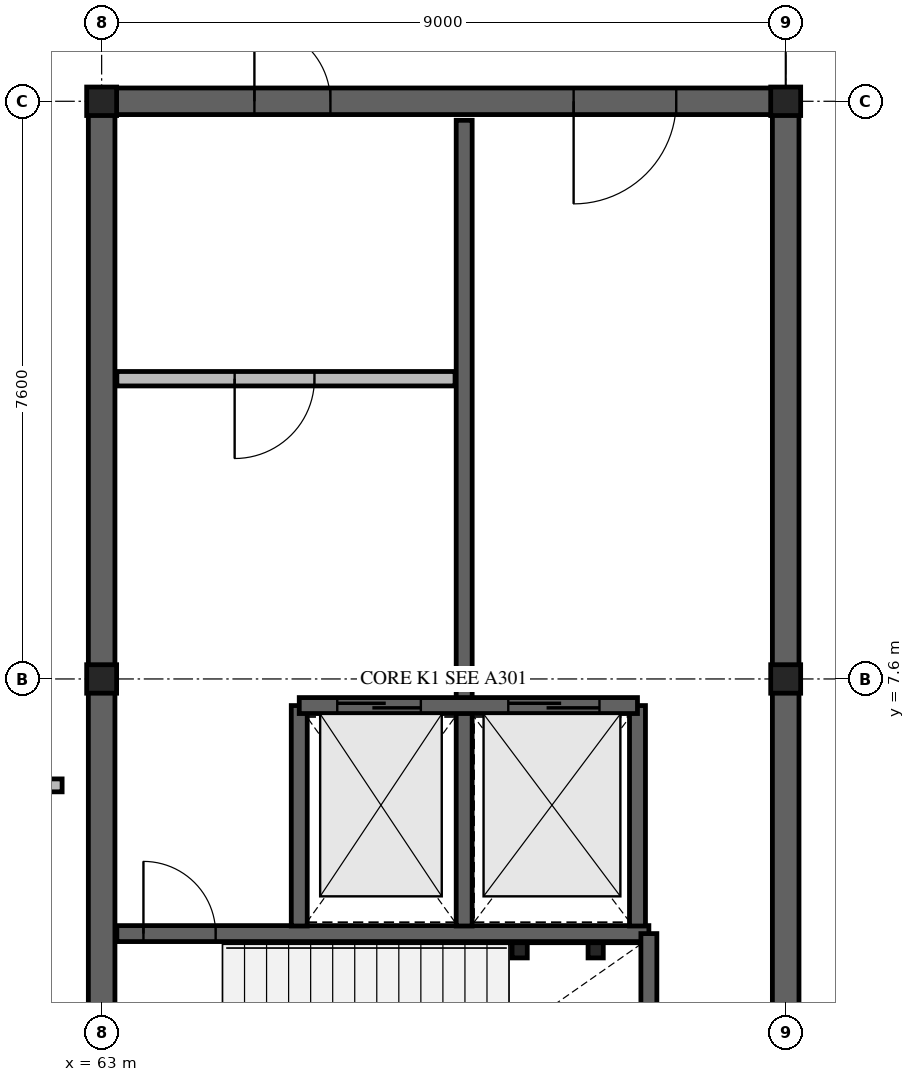
"""IFC4 building model, lengths in metres.
Left out: names, types, materials, properties, quantities, classifications, styles, units other than length and angle.
Written with IfcOpenShell. Run it as: python <this file> out.ifc"""

import sys

from ifc_helpers import new_model, si_unit, direction, frame, frame_2d, origin, origin_2d, place, context, subcontext, project, spatial, rectangle, hollow_rectangle, i_section, extrude, element, fill, save


model = new_model("IFC4")
c1 = context("Model", 3, precision=1e-05, world=origin(), true_north=direction((0.0, 1.0)))
c2 = subcontext(c1, "Body", "Model", "MODEL_VIEW")
j1 = project(units=[si_unit("LENGTHUNIT", "METRE"), si_unit("PLANEANGLEUNIT", "RADIAN")], contexts=[c1])
p1 = place(None, origin())
s1 = spatial("IfcSite", under=j1, at=p1, CompositionType="ELEMENT")
p2 = place(p1, origin())
s2 = spatial("IfcBuilding", under=s1, at=p2, CompositionType="ELEMENT")
p3 = place(p2, origin())
s3 = spatial("IfcBuildingStorey", under=s2, at=p3, CompositionType="ELEMENT", Elevation=0.0)
for number, where, z_axis, x_axis in (
    (1, (63.0, 7.6, 0.0), (0.0, 0.0, 1.0), (1.0, 0.0, 0.0)),
    (2, (63.0, 15.2, 0.0), (0.0, 0.0, 1.0), (1.0, 0.0, 0.0)),
    (3, (72.0, 7.6, 0.0), (0.0, 0.0, 1.0), (1.0, 0.0, 0.0)),
    (4, (72.0, 15.2, 0.0), (0.0, 0.0, 1.0), (1.0, 0.0, 0.0)),
):
    element("IfcColumn", number, at=place(p3, frame(where, z_axis=z_axis, x_axis=x_axis)), inside=s3, PredefinedType="COLUMN", context=c2, shape_type="SweptSolid", body=[
        extrude(i_section(OverallWidth=0.394, OverallDepth=0.375, WebThickness=0.017, FlangeThickness=0.028, FilletRadius=0.018, at=origin_2d()), origin(), (0.0, 0.0, 1.0), 5.04),
    ])
p4 = place(p3, frame((63.16, 15.2, 0.0), z_axis=(0.0, 0.0, 1.0), x_axis=(1.0, 0.0, 0.0)))
e5 = element("IfcWall", 5, at=p4, inside=s3, PredefinedType="SHEAR", context=c2, shape_type="SweptSolid", body=[
    extrude(rectangle(XDim=8.68, YDim=0.35, at=frame_2d((4.34, 0.0))), origin(), (0.0, 0.0, 1.0), 4.76),
])
p5 = place(p4, frame((1.85, 0.0, 0.0)))
e6 = element("IfcOpeningElement", 6, at=p5, cuts=e5, PredefinedType="OPENING", context=c2, shape_type="SweptSolid", body=[
    extrude(rectangle(XDim=1.0, YDim=2.15, at=frame_2d((0.5, 1.075))), frame((0.0, 0.185, 0.0), z_axis=(0.0, -1.0, 0.0), x_axis=(1.0, 0.0, 0.0)), (0.0, 0.0, 1.0), 0.37),
])
p6 = place(p4, frame((6.05, 0.0, 0.0)))
e7 = element("IfcOpeningElement", 7, at=p6, cuts=e5, PredefinedType="OPENING", context=c2, shape_type="SweptSolid", body=[
    extrude(rectangle(XDim=1.35, YDim=2.18, at=frame_2d((0.675, 1.09))), frame((0.0, 0.185, 0.0), z_axis=(0.0, -1.0, 0.0), x_axis=(1.0, 0.0, 0.0)), (0.0, 0.0, 1.0), 0.37),
])
for number, where, z_axis, x_axis in (
    (8, (63.0, 0.16, 0.0), (0.0, 0.0, 1.0), (0.0, 1.0, 0.0)),
    (9, (72.0, 0.16, 0.0), (0.0, 0.0, 1.0), (0.0, 1.0, 0.0)),
):
    element("IfcWall", number, at=place(p3, frame(where, z_axis=z_axis, x_axis=x_axis)), inside=s3, PredefinedType="SHEAR", context=c2, shape_type="SweptSolid", body=[
        extrude(rectangle(XDim=14.88, YDim=0.35, at=frame_2d((7.44, 0.0))), origin(), (0.0, 0.0, 1.0), 4.76),
    ])
p7 = place(p3, frame((63.2, 4.25, 0.0), z_axis=(0.0, 0.0, 1.0), x_axis=(1.0, 0.0, 0.0)))
e10 = element("IfcWall", 10, at=p7, inside=s3, PredefinedType="SOLIDWALL", context=c2, shape_type="SweptSolid", body=[
    extrude(rectangle(XDim=7.0, YDim=0.21, at=frame_2d((3.5, 0.0))), origin(), (0.0, 0.0, 1.0), 4.76),
])
p8 = place(p7, frame((0.35, 0.0, 0.0)))
e11 = element("IfcOpeningElement", 11, at=p8, cuts=e10, PredefinedType="OPENING", context=c2, shape_type="SweptSolid", body=[
    extrude(rectangle(XDim=0.95, YDim=2.12, at=frame_2d((0.475, 1.06))), frame((0.0, 0.115, 0.0), z_axis=(0.0, -1.0, 0.0), x_axis=(1.0, 0.0, 0.0)), (0.0, 0.0, 1.0), 0.23),
])
p9 = place(p3, frame((70.2, 0.2, 0.0), z_axis=(0.0, 0.0, 1.0), x_axis=(0.0, 1.0, 0.0)))
e12 = element("IfcWall", 12, at=p9, inside=s3, PredefinedType="SOLIDWALL", context=c2, shape_type="SweptSolid", body=[
    extrude(rectangle(XDim=4.05, YDim=0.21, at=frame_2d((2.025, 0.0))), origin(), (0.0, 0.0, 1.0), 4.76),
])
p10 = place(p3, frame((65.6, 4.35, 0.0), z_axis=(0.0, 0.0, 1.0), x_axis=(0.0, 1.0, 0.0)))
e13 = element("IfcWall", 13, at=p10, inside=s3, PredefinedType="SOLIDWALL", context=c2, shape_type="SweptSolid", body=[
    extrude(rectangle(XDim=2.9, YDim=0.21, at=frame_2d((1.45, 0.0))), origin(), (0.0, 0.0, 1.0), 4.76),
])
p11 = place(p3, frame((67.77, 4.35, 0.0), z_axis=(0.0, 0.0, 1.0), x_axis=(0.0, 1.0, 0.0)))
e14 = element("IfcWall", 14, at=p11, inside=s3, PredefinedType="SOLIDWALL", context=c2, shape_type="SweptSolid", body=[
    extrude(rectangle(XDim=10.6, YDim=0.21, at=frame_2d((5.3, 0.0))), origin(), (0.0, 0.0, 1.0), 4.76),
])
p12 = place(p3, frame((70.05, 4.35, 0.0), z_axis=(0.0, 0.0, 1.0), x_axis=(0.0, 1.0, 0.0)))
e15 = element("IfcWall", 15, at=p12, inside=s3, PredefinedType="SOLIDWALL", context=c2, shape_type="SweptSolid", body=[
    extrude(rectangle(XDim=2.9, YDim=0.21, at=frame_2d((1.45, 0.0))), origin(), (0.0, 0.0, 1.0), 4.76),
])
p13 = place(p3, frame((65.6, 7.25, 0.0), z_axis=(0.0, 0.0, 1.0), x_axis=(1.0, 0.0, 0.0)))
e16 = element("IfcWall", 16, at=p13, inside=s3, PredefinedType="SOLIDWALL", context=c2, shape_type="SweptSolid", body=[
    extrude(rectangle(XDim=4.45, YDim=0.21, at=frame_2d((2.225, 0.0))), origin(), (0.0, 0.0, 1.0), 4.76),
])
p14 = place(p13, frame((0.5, 0.0, 0.0)))
e17 = element("IfcOpeningElement", 17, at=p14, cuts=e16, PredefinedType="OPENING", context=c2, shape_type="SweptSolid", body=[
    extrude(rectangle(XDim=1.1, YDim=2.14, at=frame_2d((0.55, 1.07))), frame((0.0, 0.115, 0.0), z_axis=(0.0, -1.0, 0.0), x_axis=(1.0, 0.0, 0.0)), (0.0, 0.0, 1.0), 0.23),
])
p15 = place(p13, frame((2.75, 0.0, 0.0)))
e18 = element("IfcOpeningElement", 18, at=p15, cuts=e16, PredefinedType="OPENING", context=c2, shape_type="SweptSolid", body=[
    extrude(rectangle(XDim=1.2, YDim=2.18, at=frame_2d((0.6, 1.09))), frame((0.0, 0.115, 0.0), z_axis=(0.0, -1.0, 0.0), x_axis=(1.0, 0.0, 0.0)), (0.0, 0.0, 1.0), 0.23),
])
p16 = place(p3, frame((63.2, 11.55, 0.0), z_axis=(0.0, 0.0, 1.0), x_axis=(1.0, 0.0, 0.0)))
e19 = element("IfcWall", 19, at=p16, inside=s3, PredefinedType="SOLIDWALL", context=c2, shape_type="SweptSolid", body=[
    extrude(rectangle(XDim=4.45, YDim=0.19, at=frame_2d((2.225, 0.0))), origin(), (0.0, 0.0, 1.0), 4.76),
])
p17 = place(p16, frame((1.55, 0.0, 0.0)))
e20 = element("IfcOpeningElement", 20, at=p17, cuts=e19, PredefinedType="OPENING", context=c2, shape_type="SweptSolid", body=[
    extrude(rectangle(XDim=1.05, YDim=2.12, at=frame_2d((0.525, 1.06))), frame((0.0, 0.105, 0.0), z_axis=(0.0, -1.0, 0.0), x_axis=(1.0, 0.0, 0.0)), (0.0, 0.0, 1.0), 0.21),
])
for number, where, z_axis, x_axis in (
    (21, (68.5, 4.03, 0.0), (0.0, 0.0, 1.0), (1.0, 0.0, 0.0)),
    (22, (69.5, 4.03, 0.0), (0.0, 0.0, 1.0), (1.0, 0.0, 0.0)),
):
    element("IfcColumn", number, at=place(p3, frame(where, z_axis=z_axis, x_axis=x_axis)), inside=s3, PredefinedType="COLUMN", context=c2, shape_type="SweptSolid", body=[
        extrude(hollow_rectangle(XDim=0.2, YDim=0.2, WallThickness=0.012, at=origin_2d()), origin(), (0.0, 0.0, 1.0), 5.04),
    ])
p18 = place(p3, frame((54.52, 6.2, 0.0), z_axis=(0.0, 0.0, 1.0), x_axis=(1.0, 0.0, 0.0)))
e23 = element("IfcWall", 23, at=p18, inside=s3, PredefinedType="PARTITIONING", context=c2, shape_type="SweptSolid", body=[
    extrude(rectangle(XDim=7.96, YDim=0.17, at=frame_2d((3.98, 0.0))), origin(), (0.0, 0.0, 1.0), 4.76),
])
p19 = place(p18, frame((3.405, 0.0, 0.0)))
e24 = element("IfcOpeningElement", 24, at=p19, cuts=e23, PredefinedType="OPENING", context=c2, shape_type="SweptSolid", body=[
    extrude(rectangle(XDim=1.15, YDim=2.15, at=frame_2d((0.575, 1.075))), frame((0.0, 0.095, 0.0), z_axis=(0.0, -1.0, 0.0), x_axis=(1.0, 0.0, 0.0)), (0.0, 0.0, 1.0), 0.19),
])
p20 = place(p8, origin())
e25 = element("IfcDoor", 25, at=p20, inside=s3, OperationType="SINGLE_SWING_LEFT", PredefinedType="DOOR", context=c2, shape_type="SweptSolid", body=[
    extrude(rectangle(XDim=0.95, YDim=2.12, at=frame_2d((0.475, 1.06))), frame((0.0, 0.025, 0.0), z_axis=(0.0, -1.0, 0.0), x_axis=(1.0, 0.0, 0.0)), (0.0, 0.0, 1.0), 0.05),
])
fill(e11, e25)
p21 = place(p14, origin())
e26 = element("IfcDoor", 26, at=p21, inside=s3, OperationType="SLIDING_TO_LEFT", PredefinedType="DOOR", context=c2, shape_type="SweptSolid", body=[
    extrude(rectangle(XDim=1.1, YDim=2.14, at=frame_2d((0.55, 1.07))), frame((0.0, 0.025, 0.0), z_axis=(0.0, -1.0, 0.0), x_axis=(1.0, 0.0, 0.0)), (0.0, 0.0, 1.0), 0.05),
])
fill(e17, e26)
p22 = place(p15, origin())
e27 = element("IfcDoor", 27, at=p22, inside=s3, OperationType="SLIDING_TO_LEFT", PredefinedType="DOOR", context=c2, shape_type="SweptSolid", body=[
    extrude(rectangle(XDim=1.2, YDim=2.18, at=frame_2d((0.6, 1.09))), frame((0.0, 0.025, 0.0), z_axis=(0.0, -1.0, 0.0), x_axis=(1.0, 0.0, 0.0)), (0.0, 0.0, 1.0), 0.05),
])
fill(e18, e27)
p23 = place(p17, origin())
e28 = element("IfcDoor", 28, at=p23, inside=s3, OperationType="SINGLE_SWING_RIGHT", PredefinedType="DOOR", context=c2, shape_type="SweptSolid", body=[
    extrude(rectangle(XDim=1.05, YDim=2.12, at=frame_2d((0.525, 1.06))), frame((0.0, 0.025, 0.0), z_axis=(0.0, -1.0, 0.0), x_axis=(1.0, 0.0, 0.0)), (0.0, 0.0, 1.0), 0.05),
])
fill(e20, e28)
p24 = place(p5, origin())
e29 = element("IfcDoor", 29, at=p24, inside=s3, OperationType="SINGLE_SWING_LEFT", PredefinedType="DOOR", context=c2, shape_type="SweptSolid", body=[
    extrude(rectangle(XDim=1.0, YDim=2.15, at=frame_2d((0.5, 1.075))), frame((0.0, 0.025, 0.0), z_axis=(0.0, -1.0, 0.0), x_axis=(1.0, 0.0, 0.0)), (0.0, 0.0, 1.0), 0.05),
])
fill(e6, e29)
p25 = place(p6, origin())
e30 = element("IfcDoor", 30, at=p25, inside=s3, OperationType="SINGLE_SWING_RIGHT", PredefinedType="DOOR", context=c2, shape_type="SweptSolid", body=[
    extrude(rectangle(XDim=1.35, YDim=2.18, at=frame_2d((0.675, 1.09))), frame((0.0, 0.025, 0.0), z_axis=(0.0, -1.0, 0.0), x_axis=(1.0, 0.0, 0.0)), (0.0, 0.0, 1.0), 0.05),
])
fill(e7, e30)
save(model, sys.argv[1])
